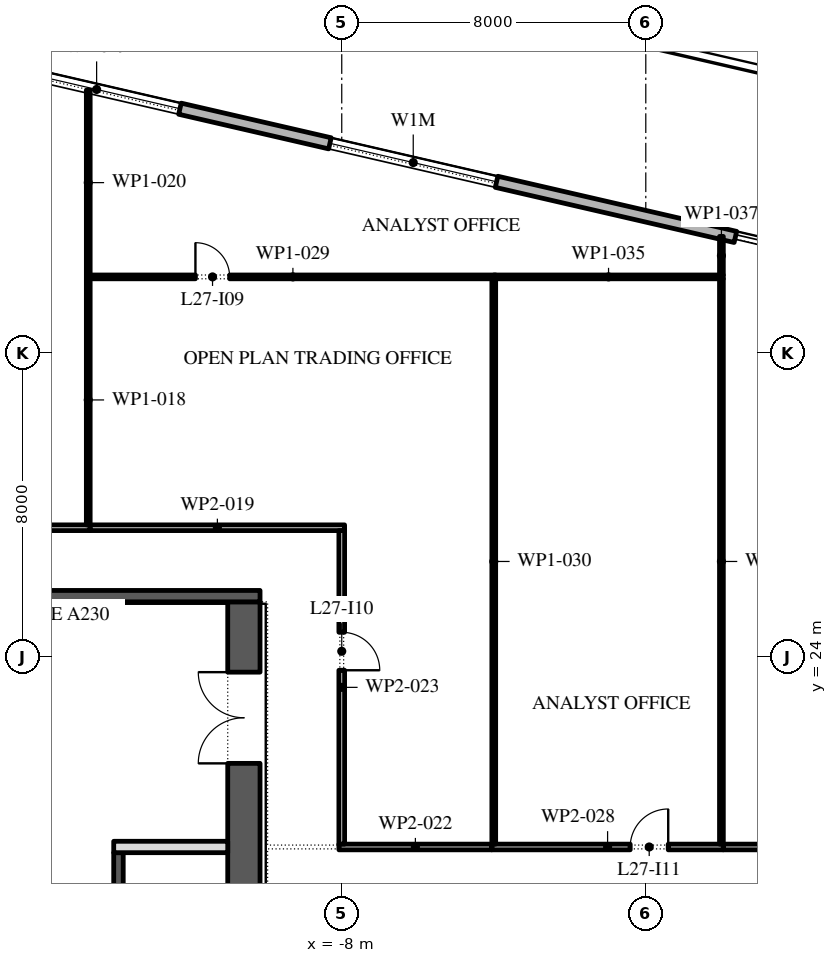
"""IFC4 building model, lengths in metres.
Left out: names, types, materials, properties, quantities, classifications, styles, units other than length and angle.
Written with IfcOpenShell. Run it as: python <this file> out.ifc"""

import sys

from ifc_helpers import new_model, si_unit, direction, frame, frame_2d, origin, place, context, subcontext, project, spatial, rectangle, extrude, element, fill, save


model = new_model("IFC4")
c1 = context("Model", 3, precision=1e-05, world=origin(), true_north=direction((0.0, 1.0)))
c2 = subcontext(c1, "Body", "Model", "MODEL_VIEW")
j1 = project(units=[si_unit("LENGTHUNIT", "METRE"), si_unit("PLANEANGLEUNIT", "RADIAN")], contexts=[c1])
p1 = place(None, origin())
s1 = spatial("IfcSite", under=j1, at=p1, CompositionType="ELEMENT")
p2 = place(p1, origin())
s2 = spatial("IfcBuilding", under=s1, at=p2, CompositionType="ELEMENT")
p3 = place(p2, frame((0.0, 0.0, 126.6)))
s3 = spatial("IfcBuildingStorey", under=s2, at=p3, CompositionType="ELEMENT", Elevation=126.6)
p4 = place(p3, frame((31.078, 28.421, 0.0), z_axis=(0.0, 0.0, 1.0), x_axis=(-0.974370456532, 0.224949357493, 0.0)))
e1 = element("IfcWall", 1, at=p4, inside=s3, PredefinedType="STANDARD", context=c2, shape_type="SweptSolid", body=[
    extrude(rectangle(XDim=51.0, YDim=0.3, at=frame_2d((25.5, 0.0))), origin(), (0.0, 0.0, 1.0), 4.0),
])
p5 = place(p4, frame((1.875, 0.0, 0.45)))
e2 = element("IfcOpeningElement", 2, at=p5, cuts=e1, PredefinedType="OPENING", context=c2, shape_type="SweptSolid", body=[
    extrude(rectangle(XDim=4.5, YDim=2.95, at=frame_2d((2.25, 1.475))), frame((0.0, 0.16, 0.0), z_axis=(0.0, -1.0, 0.0), x_axis=(1.0, 0.0, 0.0)), (0.0, 0.0, 1.0), 0.32),
])
p6 = place(p4, frame((10.275, 0.0, 0.45)))
e3 = element("IfcOpeningElement", 3, at=p6, cuts=e1, PredefinedType="OPENING", context=c2, shape_type="SweptSolid", body=[
    extrude(rectangle(XDim=4.5, YDim=2.875, at=frame_2d((2.25, 1.438))), frame((0.0, 0.16, 0.0), z_axis=(0.0, -1.0, 0.0), x_axis=(1.0, 0.0, 0.0)), (0.0, 0.0, 1.0), 0.32),
])
p7 = place(p4, frame((18.825, 0.0, 0.45)))
e4 = element("IfcOpeningElement", 4, at=p7, cuts=e1, PredefinedType="OPENING", context=c2, shape_type="SweptSolid", body=[
    extrude(rectangle(XDim=4.5, YDim=2.825, at=frame_2d((2.25, 1.413))), frame((0.0, 0.16, 0.0), z_axis=(0.0, -1.0, 0.0), x_axis=(1.0, 0.0, 0.0)), (0.0, 0.0, 1.0), 0.32),
])
p8 = place(p4, frame((27.075, 0.0, 0.0)))
e5 = element("IfcOpeningElement", 5, at=p8, cuts=e1, PredefinedType="OPENING", context=c2, shape_type="SweptSolid", body=[
    extrude(rectangle(XDim=2.4, YDim=3.125, at=frame_2d((1.2, 1.562))), frame((0.0, 0.16, 0.0), z_axis=(0.0, -1.0, 0.0), x_axis=(1.0, 0.0, 0.0)), (0.0, 0.0, 1.0), 0.32),
])
p9 = place(p4, frame((35.925, 0.0, 0.45)))
e6 = element("IfcOpeningElement", 6, at=p9, cuts=e1, PredefinedType="OPENING", context=c2, shape_type="SweptSolid", body=[
    extrude(rectangle(XDim=4.5, YDim=2.575, at=frame_2d((2.25, 1.288))), frame((0.0, 0.16, 0.0), z_axis=(0.0, -1.0, 0.0), x_axis=(1.0, 0.0, 0.0)), (0.0, 0.0, 1.0), 0.32),
])
p10 = place(p4, frame((44.475, 0.0, 0.45)))
e7 = element("IfcOpeningElement", 7, at=p10, cuts=e1, PredefinedType="OPENING", context=c2, shape_type="SweptSolid", body=[
    extrude(rectangle(XDim=4.5, YDim=3.05, at=frame_2d((2.25, 1.525))), frame((0.0, 0.16, 0.0), z_axis=(0.0, -1.0, 0.0), x_axis=(1.0, 0.0, 0.0)), (0.0, 0.0, 1.0), 0.32),
])
p11 = place(p3, frame((-10.575, -2.45, 0.0), z_axis=(0.0, 0.0, 1.0), x_axis=(0.0, 1.0, 0.0)))
e8 = element("IfcWall", 8, at=p11, inside=s3, PredefinedType="SHEAR", context=c2, shape_type="SweptSolid", body=[
    extrude(rectangle(XDim=27.9, YDim=0.85, at=frame_2d((13.95, 0.0))), origin(), (0.0, 0.0, 1.0), 4.0),
])
p12 = place(p11, frame((23.65, 0.0, 0.0)))
e9 = element("IfcOpeningElement", 9, at=p12, cuts=e8, PredefinedType="OPENING", context=c2, shape_type="SweptSolid", body=[
    extrude(rectangle(XDim=2.4, YDim=2.1, at=frame_2d((1.2, 1.05))), frame((0.0, 0.435, 0.0), z_axis=(0.0, -1.0, 0.0), x_axis=(1.0, 0.0, 0.0)), (0.0, 0.0, 1.0), 0.87),
])
p13 = place(p11, frame((1.387, 0.0, 0.0)))
e10 = element("IfcOpeningElement", 10, at=p13, cuts=e8, PredefinedType="OPENING", context=c2, shape_type="SweptSolid", body=[
    extrude(rectangle(XDim=0.9, YDim=2.1, at=frame_2d((0.45, 1.05))), frame((0.0, 0.435, 0.0), z_axis=(0.0, -1.0, 0.0), x_axis=(1.0, 0.0, 0.0)), (0.0, 0.0, 1.0), 0.87),
])
p14 = place(p11, frame((4.562, 0.0, 0.0)))
e11 = element("IfcOpeningElement", 11, at=p14, cuts=e8, PredefinedType="OPENING", context=c2, shape_type="SweptSolid", body=[
    extrude(rectangle(XDim=1.0, YDim=2.1, at=frame_2d((0.5, 1.05))), frame((0.0, 0.435, 0.0), z_axis=(0.0, -1.0, 0.0), x_axis=(1.0, 0.0, 0.0)), (0.0, 0.0, 1.0), 0.87),
])
p15 = place(p3, frame((-21.85, 25.6, 0.0), z_axis=(0.0, 0.0, 1.0), x_axis=(1.0, 0.0, 0.0)))
e12 = element("IfcWall", 12, at=p15, inside=s3, PredefinedType="SHEAR", context=c2, shape_type="SweptSolid", body=[
    extrude(rectangle(XDim=11.7, YDim=0.3, at=frame_2d((5.85, 0.0))), origin(), (0.0, 0.0, 1.0), 4.0),
])
p16 = place(p3, frame((-13.875, -2.45, 0.0), z_axis=(0.0, 0.0, 1.0), x_axis=(0.0, 1.0, 0.0)))
e13 = element("IfcWall", 13, at=p16, inside=s3, PredefinedType="SHEAR", context=c2, shape_type="SweptSolid", body=[
    extrude(rectangle(XDim=21.3, YDim=0.25, at=frame_2d((10.65, 0.0))), origin(), (0.0, 0.0, 1.0), 4.0),
])
p17 = place(p16, frame((11.446, 0.0, 0.0)))
e14 = element("IfcOpeningElement", 14, at=p17, cuts=e13, PredefinedType="OPENING", context=c2, shape_type="SweptSolid", body=[
    extrude(rectangle(XDim=0.9, YDim=2.1, at=frame_2d((0.45, 1.05))), frame((0.0, 0.135, 0.0), z_axis=(0.0, -1.0, 0.0), x_axis=(1.0, 0.0, 0.0)), (0.0, 0.0, 1.0), 0.27),
])
p18 = place(p16, frame((17.725, 0.0, 0.0)))
e15 = element("IfcOpeningElement", 15, at=p18, cuts=e13, PredefinedType="OPENING", context=c2, shape_type="SweptSolid", body=[
    extrude(rectangle(XDim=0.9, YDim=2.1, at=frame_2d((0.45, 1.05))), frame((0.0, 0.135, 0.0), z_axis=(0.0, -1.0, 0.0), x_axis=(1.0, 0.0, 0.0)), (0.0, 0.0, 1.0), 0.27),
])
p19 = place(p16, frame((6.971, 0.0, 0.0)))
e16 = element("IfcOpeningElement", 16, at=p19, cuts=e13, PredefinedType="OPENING", context=c2, shape_type="SweptSolid", body=[
    extrude(rectangle(XDim=1.1, YDim=2.1, at=frame_2d((0.55, 1.05))), frame((0.0, 0.135, 0.0), z_axis=(0.0, -1.0, 0.0), x_axis=(1.0, 0.0, 0.0)), (0.0, 0.0, 1.0), 0.27),
])
p20 = place(p3, frame((-14.0, 19.0, 0.0), z_axis=(0.0, 0.0, 1.0), x_axis=(1.0, 0.0, 0.0)))
e17 = element("IfcWall", 17, at=p20, inside=s3, PredefinedType="PARTITIONING", context=c2, shape_type="SweptSolid", body=[
    extrude(rectangle(XDim=3.0, YDim=0.3, at=frame_2d((1.5, 0.0))), origin(), (0.0, 0.0, 1.0), 4.0),
])
p21 = place(p3, frame((-23.915, 27.4, 0.0), z_axis=(0.0, 0.0, 1.0), x_axis=(1.0, 0.0, 0.0)))
e18 = element("IfcWall", 18, at=p21, inside=s3, PredefinedType="PARTITIONING", context=c2, shape_type="SweptSolid", body=[
    extrude(rectangle(XDim=9.295, YDim=0.15, at=frame_2d((4.647, 0.0))), origin(), (0.0, 0.0, 1.0), 4.0),
])
p22 = place(p21, frame((3.095, 0.0, 0.0)))
e19 = element("IfcOpeningElement", 19, at=p22, cuts=e18, PredefinedType="OPENING", context=c2, shape_type="SweptSolid", body=[
    extrude(rectangle(XDim=1.0, YDim=2.1, at=frame_2d((0.5, 1.05))), frame((0.0, 0.085, 0.0), z_axis=(0.0, -1.0, 0.0), x_axis=(1.0, 0.0, 0.0)), (0.0, 0.0, 1.0), 0.17),
])
p23 = place(p3, frame((-14.67, 27.475, 0.0), z_axis=(0.0, 0.0, 1.0), x_axis=(0.0, 1.0, 0.0)))
e20 = element("IfcWall", 20, at=p23, inside=s3, PredefinedType="PARTITIONING", context=c2, shape_type="SweptSolid", body=[
    extrude(rectangle(XDim=6.575, YDim=0.1, at=frame_2d((3.288, 0.0))), origin(), (0.0, 0.0, 1.0), 4.0),
])
p24 = place(p3, frame((-14.62, 27.4, 0.0), z_axis=(0.0, 0.0, 1.0), x_axis=(1.0, 0.0, 0.0)))
e21 = element("IfcWall", 21, at=p24, inside=s3, PredefinedType="PARTITIONING", context=c2, shape_type="SweptSolid", body=[
    extrude(rectangle(XDim=6.695, YDim=0.15, at=frame_2d((3.348, 0.0))), origin(), (0.0, 0.0, 1.0), 4.0),
])
p25 = place(p3, frame((-14.67, 34.05, 0.0), z_axis=(0.0, 0.0, 1.0), x_axis=(0.0, 1.0, 0.0)))
e22 = element("IfcWall", 22, at=p25, inside=s3, PredefinedType="PARTITIONING", context=c2, shape_type="SweptSolid", body=[
    extrude(rectangle(XDim=4.861, YDim=0.1, at=frame_2d((2.43, 0.0))), origin(), (0.0, 0.0, 1.0), 4.0),
])
p26 = place(p3, frame((-8.075, 19.0, 0.0), z_axis=(0.0, 0.0, 1.0), x_axis=(1.0, 0.0, 0.0)))
e23 = element("IfcWall", 23, at=p26, inside=s3, PredefinedType="PARTITIONING", context=c2, shape_type="SweptSolid", body=[
    extrude(rectangle(XDim=4.025, YDim=0.15, at=frame_2d((2.012, 0.0))), origin(), (0.0, 0.0, 1.0), 4.0),
])
p27 = place(p3, frame((-8.0, 27.325, 0.0), z_axis=(0.0, 0.0, 1.0), x_axis=(0.0, -1.0, 0.0)))
e24 = element("IfcWall", 24, at=p27, inside=s3, PredefinedType="PARTITIONING", context=c2, shape_type="SweptSolid", body=[
    extrude(rectangle(XDim=8.25, YDim=0.15, at=frame_2d((4.125, 0.0))), origin(), (0.0, 0.0, 1.0), 4.0),
])
p28 = place(p27, frame((2.675, 0.0, 0.0)))
e25 = element("IfcOpeningElement", 25, at=p28, cuts=e24, PredefinedType="OPENING", context=c2, shape_type="SweptSolid", body=[
    extrude(rectangle(XDim=1.0, YDim=2.1, at=frame_2d((0.5, 1.05))), frame((0.0, 0.085, 0.0), z_axis=(0.0, -1.0, 0.0), x_axis=(1.0, 0.0, 0.0)), (0.0, 0.0, 1.0), 0.17),
])
p29 = place(p3, frame((-4.05, 19.0, 0.0), z_axis=(0.0, 0.0, 1.0), x_axis=(1.0, 0.0, 0.0)))
e26 = element("IfcWall", 26, at=p29, inside=s3, PredefinedType="PARTITIONING", context=c2, shape_type="SweptSolid", body=[
    extrude(rectangle(XDim=6.09, YDim=0.15, at=frame_2d((3.045, 0.0))), origin(), (0.0, 0.0, 1.0), 4.0),
])
p30 = place(p29, frame((3.64, 0.0, 0.0)))
e27 = element("IfcOpeningElement", 27, at=p30, cuts=e26, PredefinedType="OPENING", context=c2, shape_type="SweptSolid", body=[
    extrude(rectangle(XDim=1.0, YDim=2.1, at=frame_2d((0.5, 1.05))), frame((0.0, 0.085, 0.0), z_axis=(0.0, -1.0, 0.0), x_axis=(1.0, 0.0, 0.0)), (0.0, 0.0, 1.0), 0.17),
])
p31 = place(p3, frame((-3.95, 34.0, 0.0), z_axis=(0.0, 0.0, 1.0), x_axis=(-1.0, 0.0, 0.0)))
e28 = element("IfcWall", 28, at=p31, inside=s3, PredefinedType="PARTITIONING", context=c2, shape_type="SweptSolid", body=[
    extrude(rectangle(XDim=10.67, YDim=0.1, at=frame_2d((5.335, 0.0))), origin(), (0.0, 0.0, 1.0), 4.0),
])
p32 = place(p31, frame((7.0, 0.0, 0.0)))
e29 = element("IfcOpeningElement", 29, at=p32, cuts=e28, PredefinedType="OPENING", context=c2, shape_type="SweptSolid", body=[
    extrude(rectangle(XDim=0.9, YDim=2.1, at=frame_2d((0.45, 1.05))), frame((0.0, 0.06, 0.0), z_axis=(0.0, -1.0, 0.0), x_axis=(1.0, 0.0, 0.0)), (0.0, 0.0, 1.0), 0.12),
])
p33 = place(p3, frame((-4.0, 33.95, 0.0), z_axis=(0.0, 0.0, 1.0), x_axis=(0.0, -1.0, 0.0)))
e30 = element("IfcWall", 30, at=p33, inside=s3, PredefinedType="PARTITIONING", context=c2, shape_type="SweptSolid", body=[
    extrude(rectangle(XDim=14.875, YDim=0.1, at=frame_2d((7.438, 0.0))), origin(), (0.0, 0.0, 1.0), 4.0),
])
p34 = place(p3, frame((2.04, 19.0, 0.0), z_axis=(0.0, 0.0, 1.0), x_axis=(1.0, 0.0, 0.0)))
e31 = element("IfcWall", 31, at=p34, inside=s3, PredefinedType="PARTITIONING", context=c2, shape_type="SweptSolid", body=[
    extrude(rectangle(XDim=4.375, YDim=0.15, at=frame_2d((2.188, 0.0))), origin(), (0.0, 0.0, 1.0), 4.0),
])
p35 = place(p3, frame((2.04, 34.0, 0.0), z_axis=(0.0, 0.0, 1.0), x_axis=(-1.0, 0.0, 0.0)))
e32 = element("IfcWall", 32, at=p35, inside=s3, PredefinedType="PARTITIONING", context=c2, shape_type="SweptSolid", body=[
    extrude(rectangle(XDim=6.04, YDim=0.1, at=frame_2d((3.02, 0.0))), origin(), (0.0, 0.0, 1.0), 4.0),
])
p36 = place(p3, frame((1.99, 33.95, 0.0), z_axis=(0.0, 0.0, 1.0), x_axis=(0.0, -1.0, 0.0)))
e33 = element("IfcWall", 33, at=p36, inside=s3, PredefinedType="PARTITIONING", context=c2, shape_type="SweptSolid", body=[
    extrude(rectangle(XDim=14.875, YDim=0.1, at=frame_2d((7.438, 0.0))), origin(), (0.0, 0.0, 1.0), 4.0),
])
p37 = place(p3, frame((1.99, 35.065, 0.0), z_axis=(0.0, 0.0, 1.0), x_axis=(0.0, -1.0, 0.0)))
e34 = element("IfcWall", 34, at=p37, inside=s3, PredefinedType="PARTITIONING", context=c2, shape_type="SweptSolid", body=[
    extrude(rectangle(XDim=1.015, YDim=0.1, at=frame_2d((0.507, 0.0))), origin(), (0.0, 0.0, 1.0), 4.0),
])
p38 = place(p8, origin())
e35 = element("IfcDoor", 35, at=p38, inside=s3, OperationType="DOUBLE_DOOR_SLIDING", PredefinedType="DOOR", context=c2, shape_type="SweptSolid", body=[
    extrude(rectangle(XDim=2.4, YDim=3.125, at=frame_2d((1.2, 1.562))), frame((0.0, 0.025, 0.0), z_axis=(0.0, -1.0, 0.0), x_axis=(1.0, 0.0, 0.0)), (0.0, 0.0, 1.0), 0.05),
])
fill(e5, e35)
p39 = place(p9, origin())
e36 = element("IfcWindow", 36, at=p39, inside=s3, PartitioningType="DOUBLE_PANEL_VERTICAL", PredefinedType="WINDOW", context=c2, shape_type="SweptSolid", body=[
    extrude(rectangle(XDim=4.5, YDim=2.575, at=frame_2d((2.25, 1.288))), frame((0.0, 0.03, 0.0), z_axis=(0.0, -1.0, 0.0), x_axis=(1.0, 0.0, 0.0)), (0.0, 0.0, 1.0), 0.06),
])
fill(e6, e36)
p40 = place(p10, origin())
e37 = element("IfcWindow", 37, at=p40, inside=s3, PartitioningType="DOUBLE_PANEL_VERTICAL", PredefinedType="WINDOW", context=c2, shape_type="SweptSolid", body=[
    extrude(rectangle(XDim=4.5, YDim=3.05, at=frame_2d((2.25, 1.525))), frame((0.0, 0.03, 0.0), z_axis=(0.0, -1.0, 0.0), x_axis=(1.0, 0.0, 0.0)), (0.0, 0.0, 1.0), 0.06),
])
fill(e7, e37)
p41 = place(p12, origin())
e38 = element("IfcDoor", 38, at=p41, inside=s3, OperationType="DOUBLE_DOOR_SINGLE_SWING", PredefinedType="DOOR", context=c2, shape_type="SweptSolid", body=[
    extrude(rectangle(XDim=2.4, YDim=2.1, at=frame_2d((1.2, 1.05))), frame((0.0, 0.025, 0.0), z_axis=(0.0, -1.0, 0.0), x_axis=(1.0, 0.0, 0.0)), (0.0, 0.0, 1.0), 0.05),
])
fill(e9, e38)
p42 = place(p32, frame((0.9, 0.0, 0.0), z_axis=(0.0, 0.0, 1.0), x_axis=(-1.0, 0.0, 0.0)))
e39 = element("IfcDoor", 39, at=p42, inside=s3, OperationType="SINGLE_SWING_RIGHT", PredefinedType="DOOR", context=c2, shape_type="SweptSolid", body=[
    extrude(rectangle(XDim=0.9, YDim=2.1, at=frame_2d((0.45, 1.05))), frame((0.0, 0.025, 0.0), z_axis=(0.0, -1.0, 0.0), x_axis=(1.0, 0.0, 0.0)), (0.0, 0.0, 1.0), 0.05),
])
fill(e29, e39)
p43 = place(p28, origin())
e40 = element("IfcDoor", 40, at=p43, inside=s3, OperationType="SINGLE_SWING_LEFT", PredefinedType="DOOR", context=c2, shape_type="SweptSolid", body=[
    extrude(rectangle(XDim=1.0, YDim=2.1, at=frame_2d((0.5, 1.05))), frame((0.0, 0.025, 0.0), z_axis=(0.0, -1.0, 0.0), x_axis=(1.0, 0.0, 0.0)), (0.0, 0.0, 1.0), 0.05),
])
fill(e25, e40)
p44 = place(p30, origin())
e41 = element("IfcDoor", 41, at=p44, inside=s3, OperationType="SINGLE_SWING_LEFT", PredefinedType="DOOR", context=c2, shape_type="SweptSolid", body=[
    extrude(rectangle(XDim=1.0, YDim=2.1, at=frame_2d((0.5, 1.05))), frame((0.0, 0.025, 0.0), z_axis=(0.0, -1.0, 0.0), x_axis=(1.0, 0.0, 0.0)), (0.0, 0.0, 1.0), 0.05),
])
fill(e27, e41)
save(model, sys.argv[1])
